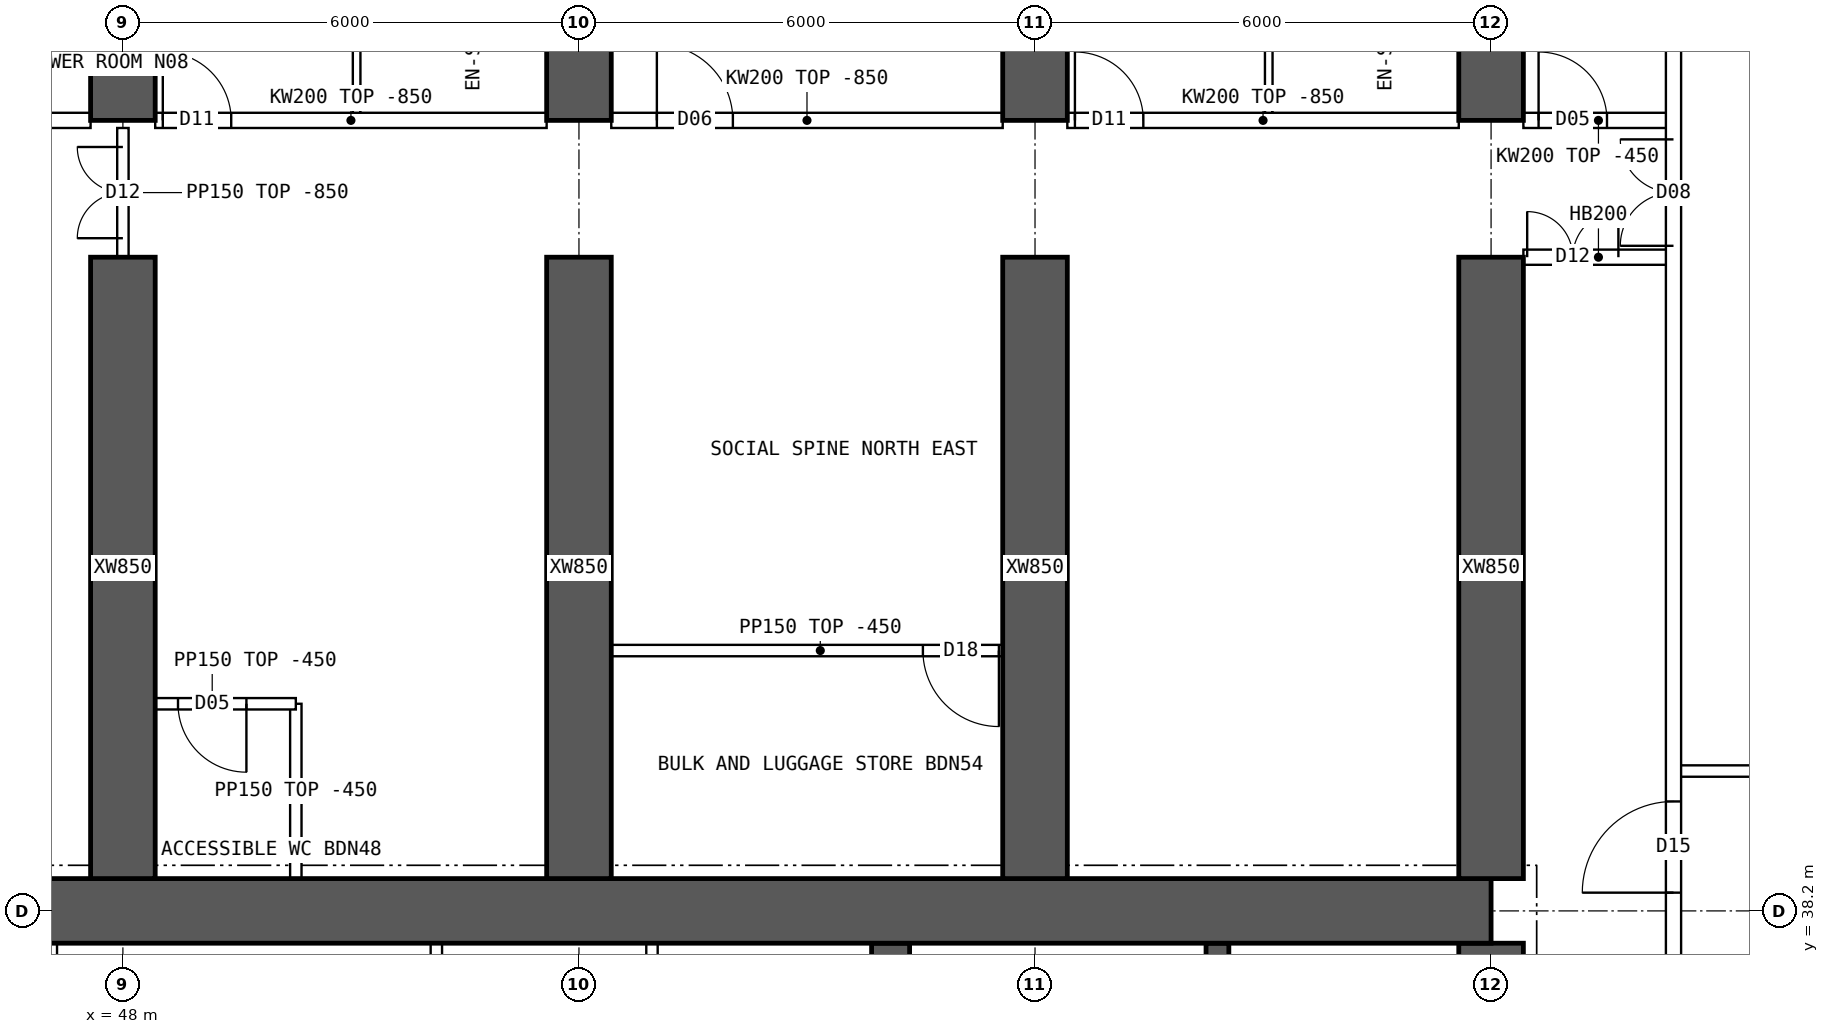
"""IFC4 building model, lengths in metres.
Left out: names, types, materials, properties, quantities, classifications, styles, units other than length and angle.
Written with IfcOpenShell. Run it as: python <this file> out.ifc"""

import sys

from ifc_helpers import new_model, si_unit, direction, frame, frame_2d, origin, place, context, subcontext, project, spatial, polyline, rectangle, outline, extrude, element, fill, save


model = new_model("IFC4")
c1 = context("Model", 3, precision=1e-05, world=origin(), true_north=direction((0.0, 1.0)))
c2 = subcontext(c1, "Body", "Model", "MODEL_VIEW")
j1 = project(units=[si_unit("LENGTHUNIT", "METRE"), si_unit("PLANEANGLEUNIT", "RADIAN")], contexts=[c1])
p1 = place(None, origin())
s1 = spatial("IfcSite", under=j1, at=p1, CompositionType="ELEMENT")
p2 = place(p1, origin())
s2 = spatial("IfcBuilding", under=s1, at=p2, CompositionType="ELEMENT")
p3 = place(p2, frame((0.0, 0.0, 144.85)))
s3 = spatial("IfcBuildingStorey", under=s2, at=p3, CompositionType="ELEMENT", Elevation=144.85)
p4 = place(p3, frame((18.0, 38.2, 0.0), z_axis=(0.0, 0.0, 1.0), x_axis=(1.0, 0.0, 0.0)))
e1 = element("IfcWall", 1, at=p4, inside=s3, PredefinedType="SHEAR", context=c2, shape_type="SweptSolid", body=[
    extrude(rectangle(XDim=48.0, YDim=0.85, at=frame_2d((24.0, 0.0))), origin(), (0.0, 0.0, 1.0), 3.75),
])
p5 = place(p3, frame((66.0, 26.225, 0.0), z_axis=(0.0, 0.0, 1.0), x_axis=(0.0, 1.0, 0.0)))
e2 = element("IfcWall", 2, at=p5, inside=s3, PredefinedType="SHEAR", context=c2, shape_type="SweptSolid", body=[
    extrude(rectangle(XDim=11.55, YDim=0.85, at=frame_2d((5.775, 0.0))), origin(), (0.0, 0.0, 1.0), 3.75),
])
p6 = place(p5, frame((5.075, 0.0, 0.0)))
e3 = element("IfcOpeningElement", 3, at=p6, cuts=e2, PredefinedType="OPENING", context=c2, shape_type="SweptSolid", body=[
    extrude(rectangle(XDim=1.2, YDim=2.1, at=frame_2d((0.6, 1.05))), frame((0.0, 0.435, 0.0), z_axis=(0.0, -1.0, 0.0), x_axis=(1.0, 0.0, 0.0)), (0.0, 0.0, 1.0), 0.87),
])
p7 = place(p3, frame((62.4, 34.75, 0.0), z_axis=(0.0, 0.0, 1.0), x_axis=(0.0, 1.0, 0.0)))
e4 = element("IfcWall", 4, at=p7, inside=s3, PredefinedType="SHEAR", context=c2, shape_type="SweptSolid", body=[
    extrude(rectangle(XDim=3.025, YDim=0.3, at=frame_2d((1.512, 0.0))), origin(), (0.0, 0.0, 1.0), 3.75),
])
p8 = place(p3, frame((58.1, 34.75, 0.0), z_axis=(0.0, 0.0, 1.0), x_axis=(0.0, 1.0, 0.0)))
e5 = element("IfcWall", 5, at=p8, inside=s3, PredefinedType="SHEAR", context=c2, shape_type="SweptSolid", body=[
    extrude(rectangle(XDim=3.025, YDim=0.5, at=frame_2d((1.512, 0.0))), origin(), (0.0, 0.0, 1.0), 3.75),
])
p9 = place(p3, frame((48.0, 48.6, 0.0), z_axis=(0.0, 0.0, 1.0), x_axis=(0.0, 1.0, 0.0)))
e6 = element("IfcWall", 6, at=p9, inside=s3, PredefinedType="SHEAR", context=c2, shape_type="SweptSolid", body=[
    extrude(rectangle(XDim=5.4, YDim=0.85, at=frame_2d((2.7, 0.0))), origin(), (0.0, 0.0, 1.0), 3.75),
])
p10 = place(p3, frame((48.0, 38.625, 0.0), z_axis=(0.0, 0.0, 1.0), x_axis=(0.0, 1.0, 0.0)))
e7 = element("IfcWall", 7, at=p10, inside=s3, PredefinedType="SHEAR", context=c2, shape_type="SweptSolid", body=[
    extrude(rectangle(XDim=8.175, YDim=0.85, at=frame_2d((4.087, 0.0))), origin(), (0.0, 0.0, 1.0), 3.75),
])
p11 = place(p3, frame((54.0, 48.6, 0.0), z_axis=(0.0, 0.0, 1.0), x_axis=(0.0, 1.0, 0.0)))
e8 = element("IfcWall", 8, at=p11, inside=s3, PredefinedType="SHEAR", context=c2, shape_type="SweptSolid", body=[
    extrude(rectangle(XDim=5.4, YDim=0.85, at=frame_2d((2.7, 0.0))), origin(), (0.0, 0.0, 1.0), 3.75),
])
p12 = place(p3, frame((54.0, 38.625, 0.0), z_axis=(0.0, 0.0, 1.0), x_axis=(0.0, 1.0, 0.0)))
e9 = element("IfcWall", 9, at=p12, inside=s3, PredefinedType="SHEAR", context=c2, shape_type="SweptSolid", body=[
    extrude(rectangle(XDim=8.175, YDim=0.85, at=frame_2d((4.087, 0.0))), origin(), (0.0, 0.0, 1.0), 3.75),
])
p13 = place(p3, frame((60.0, 48.6, 0.0), z_axis=(0.0, 0.0, 1.0), x_axis=(0.0, 1.0, 0.0)))
e10 = element("IfcWall", 10, at=p13, inside=s3, PredefinedType="SHEAR", context=c2, shape_type="SweptSolid", body=[
    extrude(rectangle(XDim=5.4, YDim=0.85, at=frame_2d((2.7, 0.0))), origin(), (0.0, 0.0, 1.0), 3.75),
])
p14 = place(p3, frame((60.0, 38.625, 0.0), z_axis=(0.0, 0.0, 1.0), x_axis=(0.0, 1.0, 0.0)))
e11 = element("IfcWall", 11, at=p14, inside=s3, PredefinedType="SHEAR", context=c2, shape_type="SweptSolid", body=[
    extrude(rectangle(XDim=8.175, YDim=0.85, at=frame_2d((4.087, 0.0))), origin(), (0.0, 0.0, 1.0), 3.75),
])
p15 = place(p3, frame((66.0, 48.6, 0.0), z_axis=(0.0, 0.0, 1.0), x_axis=(0.0, 1.0, 0.0)))
e12 = element("IfcWall", 12, at=p15, inside=s3, PredefinedType="SHEAR", context=c2, shape_type="SweptSolid", body=[
    extrude(rectangle(XDim=5.4, YDim=0.85, at=frame_2d((2.7, 0.0))), origin(), (0.0, 0.0, 1.0), 3.75),
])
p16 = place(p3, frame((66.0, 38.625, 0.0), z_axis=(0.0, 0.0, 1.0), x_axis=(0.0, 1.0, 0.0)))
e13 = element("IfcWall", 13, at=p16, inside=s3, PredefinedType="SHEAR", context=c2, shape_type="SweptSolid", body=[
    extrude(rectangle(XDim=8.175, YDim=0.85, at=frame_2d((4.087, 0.0))), origin(), (0.0, 0.0, 1.0), 3.75),
])
for number, where, z_axis, x_axis in (
    (14, (47.058, 34.75, 0.0), (0.0, 0.0, 1.0), (0.0, 1.0, 0.0)),
    (15, (52.124, 34.75, 0.0), (0.0, 0.0, 1.0), (0.0, 1.0, 0.0)),
    (16, (54.961, 34.75, 0.0), (0.0, 0.0, 1.0), (0.0, 1.0, 0.0)),
):
    element("IfcWall", number, at=place(p3, frame(where, z_axis=z_axis, x_axis=x_axis)), inside=s3, PredefinedType="SOLIDWALL", context=c2, shape_type="SweptSolid", body=[
        extrude(rectangle(XDim=3.025, YDim=0.15, at=frame_2d((1.512, 0.0))), origin(), (0.0, 0.0, 1.0), 3.3),
    ])
p17 = place(p3, frame((42.425, 48.6, 0.0), z_axis=(0.0, 0.0, 1.0), x_axis=(1.0, 0.0, 0.0)))
e17 = element("IfcWall", 17, at=p17, inside=s3, PredefinedType="SOLIDWALL", context=c2, shape_type="SweptSolid", body=[
    extrude(outline(polyline([(0.0, 0.0), (5.15, 0.0), (5.15, 2.9), (0.0, 2.9), (0.0, 0.0)])), frame((0.0, 0.1, 0.0), z_axis=(0.0, -1.0, 0.0), x_axis=(1.0, 0.0, 0.0)), (0.0, 0.0, 1.0), 0.2),
])
p18 = place(p17, frame((2.3, 0.0, 0.0)))
e18 = element("IfcOpeningElement", 18, at=p18, cuts=e17, PredefinedType="OPENING", context=c2, shape_type="SweptSolid", body=[
    extrude(rectangle(XDim=0.9, YDim=2.1, at=frame_2d((0.45, 1.05))), frame((0.0, 0.11, 0.0), z_axis=(0.0, -1.0, 0.0), x_axis=(1.0, 0.0, 0.0)), (0.0, 0.0, 1.0), 0.22),
])
p19 = place(p3, frame((48.425, 48.6, 0.0), z_axis=(0.0, 0.0, 1.0), x_axis=(1.0, 0.0, 0.0)))
e19 = element("IfcWall", 19, at=p19, inside=s3, PredefinedType="SOLIDWALL", context=c2, shape_type="SweptSolid", body=[
    extrude(outline(polyline([(0.0, 0.0), (5.15, 0.0), (5.15, 2.9), (0.0, 2.9), (0.0, 0.0)])), frame((0.0, 0.1, 0.0), z_axis=(0.0, -1.0, 0.0), x_axis=(1.0, 0.0, 0.0)), (0.0, 0.0, 1.0), 0.2),
])
p20 = place(p19, frame((0.1, 0.0, 0.0)))
e20 = element("IfcOpeningElement", 20, at=p20, cuts=e19, PredefinedType="OPENING", context=c2, shape_type="SweptSolid", body=[
    extrude(rectangle(XDim=0.9, YDim=2.1, at=frame_2d((0.45, 1.05))), frame((0.0, 0.11, 0.0), z_axis=(0.0, -1.0, 0.0), x_axis=(1.0, 0.0, 0.0)), (0.0, 0.0, 1.0), 0.22),
])
p21 = place(p3, frame((54.425, 48.6, 0.0), z_axis=(0.0, 0.0, 1.0), x_axis=(1.0, 0.0, 0.0)))
e21 = element("IfcWall", 21, at=p21, inside=s3, PredefinedType="SOLIDWALL", context=c2, shape_type="SweptSolid", body=[
    extrude(outline(polyline([(0.0, 0.0), (5.15, 0.0), (5.15, 2.9), (0.0, 2.9), (0.0, 0.0)])), frame((0.0, 0.1, 0.0), z_axis=(0.0, -1.0, 0.0), x_axis=(1.0, 0.0, 0.0)), (0.0, 0.0, 1.0), 0.2),
])
p22 = place(p21, frame((0.6, 0.0, 0.0)))
e22 = element("IfcOpeningElement", 22, at=p22, cuts=e21, PredefinedType="OPENING", context=c2, shape_type="SweptSolid", body=[
    extrude(rectangle(XDim=1.0, YDim=2.1, at=frame_2d((0.5, 1.05))), frame((0.0, 0.11, 0.0), z_axis=(0.0, -1.0, 0.0), x_axis=(1.0, 0.0, 0.0)), (0.0, 0.0, 1.0), 0.22),
])
p23 = place(p3, frame((60.425, 48.6, 0.0), z_axis=(0.0, 0.0, 1.0), x_axis=(1.0, 0.0, 0.0)))
e23 = element("IfcWall", 23, at=p23, inside=s3, PredefinedType="SOLIDWALL", context=c2, shape_type="SweptSolid", body=[
    extrude(outline(polyline([(0.0, 0.0), (5.15, 0.0), (5.15, 2.9), (0.0, 2.9), (0.0, 0.0)])), frame((0.0, 0.1, 0.0), z_axis=(0.0, -1.0, 0.0), x_axis=(1.0, 0.0, 0.0)), (0.0, 0.0, 1.0), 0.2),
])
p24 = place(p23, frame((0.1, 0.0, 0.0)))
e24 = element("IfcOpeningElement", 24, at=p24, cuts=e23, PredefinedType="OPENING", context=c2, shape_type="SweptSolid", body=[
    extrude(rectangle(XDim=0.9, YDim=2.1, at=frame_2d((0.45, 1.05))), frame((0.0, 0.11, 0.0), z_axis=(0.0, -1.0, 0.0), x_axis=(1.0, 0.0, 0.0)), (0.0, 0.0, 1.0), 0.22),
])
p25 = place(p3, frame((66.425, 48.6, 0.0), z_axis=(0.0, 0.0, 1.0), x_axis=(1.0, 0.0, 0.0)))
e25 = element("IfcWall", 25, at=p25, inside=s3, PredefinedType="SOLIDWALL", context=c2, shape_type="SweptSolid", body=[
    extrude(rectangle(XDim=1.975, YDim=0.2, at=frame_2d((0.987, 0.0))), origin(), (0.0, 0.0, 1.0), 3.3),
])
p26 = place(p25, frame((0.2, 0.0, 0.0)))
e26 = element("IfcOpeningElement", 26, at=p26, cuts=e25, PredefinedType="OPENING", context=c2, shape_type="SweptSolid", body=[
    extrude(rectangle(XDim=0.9, YDim=2.1, at=frame_2d((0.45, 1.05))), frame((0.0, 0.11, 0.0), z_axis=(0.0, -1.0, 0.0), x_axis=(1.0, 0.0, 0.0)), (0.0, 0.0, 1.0), 0.22),
])
p27 = place(p3, frame((66.425, 46.8, 0.0), z_axis=(0.0, 0.0, 1.0), x_axis=(1.0, 0.0, 0.0)))
e27 = element("IfcWall", 27, at=p27, inside=s3, PredefinedType="SOLIDWALL", context=c2, shape_type="SweptSolid", body=[
    extrude(rectangle(XDim=1.975, YDim=0.2, at=frame_2d((0.987, 0.0))), origin(), (0.0, 0.0, 1.0), 3.3),
])
p28 = place(p27, frame((0.05, 0.0, 0.0)))
e28 = element("IfcOpeningElement", 28, at=p28, cuts=e27, PredefinedType="OPENING", context=c2, shape_type="SweptSolid", body=[
    extrude(rectangle(XDim=1.2, YDim=2.1, at=frame_2d((0.6, 1.05))), frame((0.0, 0.11, 0.0), z_axis=(0.0, -1.0, 0.0), x_axis=(1.0, 0.0, 0.0)), (0.0, 0.0, 1.0), 0.22),
])
for number, where, z_axis, x_axis in (
    (29, (51.075, 51.05, 0.0), (0.0, 0.0, 1.0), (0.0, -1.0, 0.0)),
    (30, (63.075, 51.05, 0.0), (0.0, 0.0, 1.0), (0.0, -1.0, 0.0)),
):
    element("IfcWall", number, at=place(p3, frame(where, z_axis=z_axis, x_axis=x_axis)), inside=s3, PredefinedType="PARTITIONING", context=c2, shape_type="SweptSolid", body=[
        extrude(outline(polyline([(0.0, 0.0), (2.35, 0.0), (2.35, 2.9), (2.302, 2.9), (2.3, 3.3), (0.0, 3.3), (0.0, 0.0)])), frame((0.0, 0.05, 0.0), z_axis=(0.0, -1.0, 0.0), x_axis=(1.0, 0.0, 0.0)), (0.0, 0.0, 1.0), 0.1),
    ])
p29 = place(p3, frame((50.275, 40.925, 0.0), z_axis=(0.0, 0.0, 1.0), x_axis=(0.0, -1.0, 0.0)))
e31 = element("IfcWall", 31, at=p29, inside=s3, PredefinedType="PARTITIONING", context=c2, shape_type="SweptSolid", body=[
    extrude(rectangle(XDim=2.3, YDim=0.15, at=frame_2d((1.15, 0.0))), origin(), (0.0, 0.0, 1.0), 3.3),
])
p30 = place(p3, frame((50.275, 40.925, 0.0), z_axis=(0.0, 0.0, 1.0), x_axis=(-1.0, 0.0, 0.0)))
e32 = element("IfcWall", 32, at=p30, inside=s3, PredefinedType="PARTITIONING", context=c2, shape_type="SweptSolid", body=[
    extrude(rectangle(XDim=2.2, YDim=0.15, at=frame_2d((1.1, 0.0))), origin(), (0.0, 0.0, 1.0), 3.3),
])
p31 = place(p30, frame((0.65, 0.0, 0.0)))
e33 = element("IfcOpeningElement", 33, at=p31, cuts=e32, PredefinedType="OPENING", context=c2, shape_type="SweptSolid", body=[
    extrude(rectangle(XDim=0.9, YDim=2.1, at=frame_2d((0.45, 1.05))), frame((0.0, 0.085, 0.0), z_axis=(0.0, -1.0, 0.0), x_axis=(1.0, 0.0, 0.0)), (0.0, 0.0, 1.0), 0.17),
])
p32 = place(p3, frame((59.925, 41.625, 0.0), z_axis=(0.0, 0.0, 1.0), x_axis=(-1.0, 0.0, 0.0)))
e34 = element("IfcWall", 34, at=p32, inside=s3, PredefinedType="PARTITIONING", context=c2, shape_type="SweptSolid", body=[
    extrude(rectangle(XDim=5.5, YDim=0.15, at=frame_2d((2.75, 0.0))), origin(), (0.0, 0.0, 1.0), 3.3),
])
p33 = place(p32, frame((0.4, 0.0, 0.0)))
e35 = element("IfcOpeningElement", 35, at=p33, cuts=e34, PredefinedType="OPENING", context=c2, shape_type="SweptSolid", body=[
    extrude(rectangle(XDim=1.0, YDim=2.1, at=frame_2d((0.5, 1.05))), frame((0.0, 0.085, 0.0), z_axis=(0.0, -1.0, 0.0), x_axis=(1.0, 0.0, 0.0)), (0.0, 0.0, 1.0), 0.17),
])
p34 = place(p3, frame((48.0, 46.8, 0.0), z_axis=(0.0, 0.0, 1.0), x_axis=(0.0, 1.0, 0.0)))
e36 = element("IfcWall", 36, at=p34, inside=s3, PredefinedType="PARTITIONING", context=c2, shape_type="SweptSolid", body=[
    extrude(outline(polyline([(0.0, 0.0), (1.7, 0.0), (1.7, 2.9), (0.0, 2.9), (0.0, 0.0)])), frame((0.0, 0.075, 0.0), z_axis=(0.0, -1.0, 0.0), x_axis=(1.0, 0.0, 0.0)), (0.0, 0.0, 1.0), 0.15),
])
p35 = place(p34, frame((0.25, 0.0, 0.0)))
e37 = element("IfcOpeningElement", 37, at=p35, cuts=e36, PredefinedType="OPENING", context=c2, shape_type="SweptSolid", body=[
    extrude(rectangle(XDim=1.2, YDim=2.1, at=frame_2d((0.6, 1.05))), frame((0.0, 0.085, 0.0), z_axis=(0.0, -1.0, 0.0), x_axis=(1.0, 0.0, 0.0)), (0.0, 0.0, 1.0), 0.17),
])
p36 = place(p3, frame((68.4, 10.446, 0.0), z_axis=(0.0, 0.0, 1.0), x_axis=(0.0, 1.0, 0.0)))
e38 = element("IfcWall", 38, at=p36, inside=s3, PredefinedType="SOLIDWALL", context=c2, shape_type="SweptSolid", body=[
    extrude(rectangle(XDim=43.107, YDim=0.2, at=frame_2d((21.554, 0.0))), origin(), (0.0, 0.0, 1.0), 3.3),
])
p37 = place(p36, frame((27.994, 0.0, 0.0)))
e39 = element("IfcOpeningElement", 39, at=p37, cuts=e38, PredefinedType="OPENING", context=c2, shape_type="SweptSolid", body=[
    extrude(rectangle(XDim=1.2, YDim=2.1, at=frame_2d((0.6, 1.05))), frame((0.0, 0.11, 0.0), z_axis=(0.0, -1.0, 0.0), x_axis=(1.0, 0.0, 0.0)), (0.0, 0.0, 1.0), 0.22),
])
p38 = place(p36, frame((5.104, 0.0, 0.0)))
e40 = element("IfcOpeningElement", 40, at=p38, cuts=e38, PredefinedType="OPENING", context=c2, shape_type="SweptSolid", body=[
    extrude(rectangle(XDim=1.4, YDim=2.1, at=frame_2d((0.7, 1.05))), frame((0.0, 0.11, 0.0), z_axis=(0.0, -1.0, 0.0), x_axis=(1.0, 0.0, 0.0)), (0.0, 0.0, 1.0), 0.22),
])
p39 = place(p36, frame((36.504, 0.0, 0.0)))
e41 = element("IfcOpeningElement", 41, at=p39, cuts=e38, PredefinedType="OPENING", context=c2, shape_type="SweptSolid", body=[
    extrude(rectangle(XDim=1.4, YDim=2.1, at=frame_2d((0.7, 1.05))), frame((0.0, 0.11, 0.0), z_axis=(0.0, -1.0, 0.0), x_axis=(1.0, 0.0, 0.0)), (0.0, 0.0, 1.0), 0.22),
])
p40 = place(p3, frame((68.475, 40.04, 0.0), z_axis=(0.0, 0.0, 1.0), x_axis=(1.0, 0.0, 0.0)))
e42 = element("IfcWall", 42, at=p40, inside=s3, PredefinedType="PARTITIONING", context=c2, shape_type="SweptSolid", body=[
    extrude(rectangle(XDim=6.82, YDim=0.15, at=frame_2d((3.41, 0.0))), origin(), (0.0, 0.0, 1.0), 3.3),
])
p41 = place(p28, origin())
e43 = element("IfcDoor", 43, at=p41, inside=s3, OperationType="DOUBLE_DOOR_SINGLE_SWING", PredefinedType="DOOR", context=c2, shape_type="SweptSolid", body=[
    extrude(rectangle(XDim=1.2, YDim=2.1, at=frame_2d((0.6, 1.05))), frame((0.0, 0.025, 0.0), z_axis=(0.0, -1.0, 0.0), x_axis=(1.0, 0.0, 0.0)), (0.0, 0.0, 1.0), 0.05),
])
fill(e28, e43)
p42 = place(p20, origin())
e44 = element("IfcDoor", 44, at=p42, inside=s3, OperationType="SINGLE_SWING_LEFT", PredefinedType="DOOR", context=c2, shape_type="SweptSolid", body=[
    extrude(rectangle(XDim=0.9, YDim=2.1, at=frame_2d((0.45, 1.05))), frame((0.0, 0.025, 0.0), z_axis=(0.0, -1.0, 0.0), x_axis=(1.0, 0.0, 0.0)), (0.0, 0.0, 1.0), 0.05),
])
fill(e20, e44)
p43 = place(p22, origin())
e45 = element("IfcDoor", 45, at=p43, inside=s3, OperationType="SINGLE_SWING_LEFT", PredefinedType="DOOR", context=c2, shape_type="SweptSolid", body=[
    extrude(rectangle(XDim=1.0, YDim=2.1, at=frame_2d((0.5, 1.05))), frame((0.0, 0.025, 0.0), z_axis=(0.0, -1.0, 0.0), x_axis=(1.0, 0.0, 0.0)), (0.0, 0.0, 1.0), 0.05),
])
fill(e22, e45)
p44 = place(p24, origin())
e46 = element("IfcDoor", 46, at=p44, inside=s3, OperationType="SINGLE_SWING_LEFT", PredefinedType="DOOR", context=c2, shape_type="SweptSolid", body=[
    extrude(rectangle(XDim=0.9, YDim=2.1, at=frame_2d((0.45, 1.05))), frame((0.0, 0.025, 0.0), z_axis=(0.0, -1.0, 0.0), x_axis=(1.0, 0.0, 0.0)), (0.0, 0.0, 1.0), 0.05),
])
fill(e24, e46)
p45 = place(p31, origin())
e47 = element("IfcDoor", 47, at=p45, inside=s3, OperationType="SINGLE_SWING_LEFT", PredefinedType="DOOR", context=c2, shape_type="SweptSolid", body=[
    extrude(rectangle(XDim=0.9, YDim=2.1, at=frame_2d((0.45, 1.05))), frame((0.0, 0.025, 0.0), z_axis=(0.0, -1.0, 0.0), x_axis=(1.0, 0.0, 0.0)), (0.0, 0.0, 1.0), 0.05),
])
fill(e33, e47)
p46 = place(p33, origin())
e48 = element("IfcDoor", 48, at=p46, inside=s3, OperationType="SINGLE_SWING_LEFT", PredefinedType="DOOR", context=c2, shape_type="SweptSolid", body=[
    extrude(rectangle(XDim=1.0, YDim=2.1, at=frame_2d((0.5, 1.05))), frame((0.0, 0.025, 0.0), z_axis=(0.0, -1.0, 0.0), x_axis=(1.0, 0.0, 0.0)), (0.0, 0.0, 1.0), 0.05),
])
fill(e35, e48)
p47 = place(p35, origin())
e49 = element("IfcDoor", 49, at=p47, inside=s3, OperationType="DOUBLE_DOOR_SINGLE_SWING", PredefinedType="DOOR", context=c2, shape_type="SweptSolid", body=[
    extrude(rectangle(XDim=1.2, YDim=2.1, at=frame_2d((0.6, 1.05))), frame((0.0, 0.025, 0.0), z_axis=(0.0, -1.0, 0.0), x_axis=(1.0, 0.0, 0.0)), (0.0, 0.0, 1.0), 0.05),
])
fill(e37, e49)
p48 = place(p37, origin())
e50 = element("IfcDoor", 50, at=p48, inside=s3, OperationType="SINGLE_SWING_LEFT", PredefinedType="DOOR", context=c2, shape_type="SweptSolid", body=[
    extrude(rectangle(XDim=1.2, YDim=2.1, at=frame_2d((0.6, 1.05))), frame((0.0, 0.025, 0.0), z_axis=(0.0, -1.0, 0.0), x_axis=(1.0, 0.0, 0.0)), (0.0, 0.0, 1.0), 0.05),
])
fill(e39, e50)
p49 = place(p39, origin())
e51 = element("IfcDoor", 51, at=p49, inside=s3, OperationType="DOUBLE_DOOR_SINGLE_SWING", PredefinedType="DOOR", context=c2, shape_type="SweptSolid", body=[
    extrude(rectangle(XDim=1.4, YDim=2.1, at=frame_2d((0.7, 1.05))), frame((0.0, 0.025, 0.0), z_axis=(0.0, -1.0, 0.0), x_axis=(1.0, 0.0, 0.0)), (0.0, 0.0, 1.0), 0.05),
])
fill(e41, e51)
p50 = place(p26, origin())
e52 = element("IfcDoor", 52, at=p50, inside=s3, OperationType="SINGLE_SWING_LEFT", PredefinedType="DOOR", context=c2, shape_type="SweptSolid", body=[
    extrude(rectangle(XDim=0.9, YDim=2.1, at=frame_2d((0.45, 1.05))), frame((0.0, 0.025, 0.0), z_axis=(0.0, -1.0, 0.0), x_axis=(1.0, 0.0, 0.0)), (0.0, 0.0, 1.0), 0.05),
])
fill(e26, e52)
save(model, sys.argv[1])
